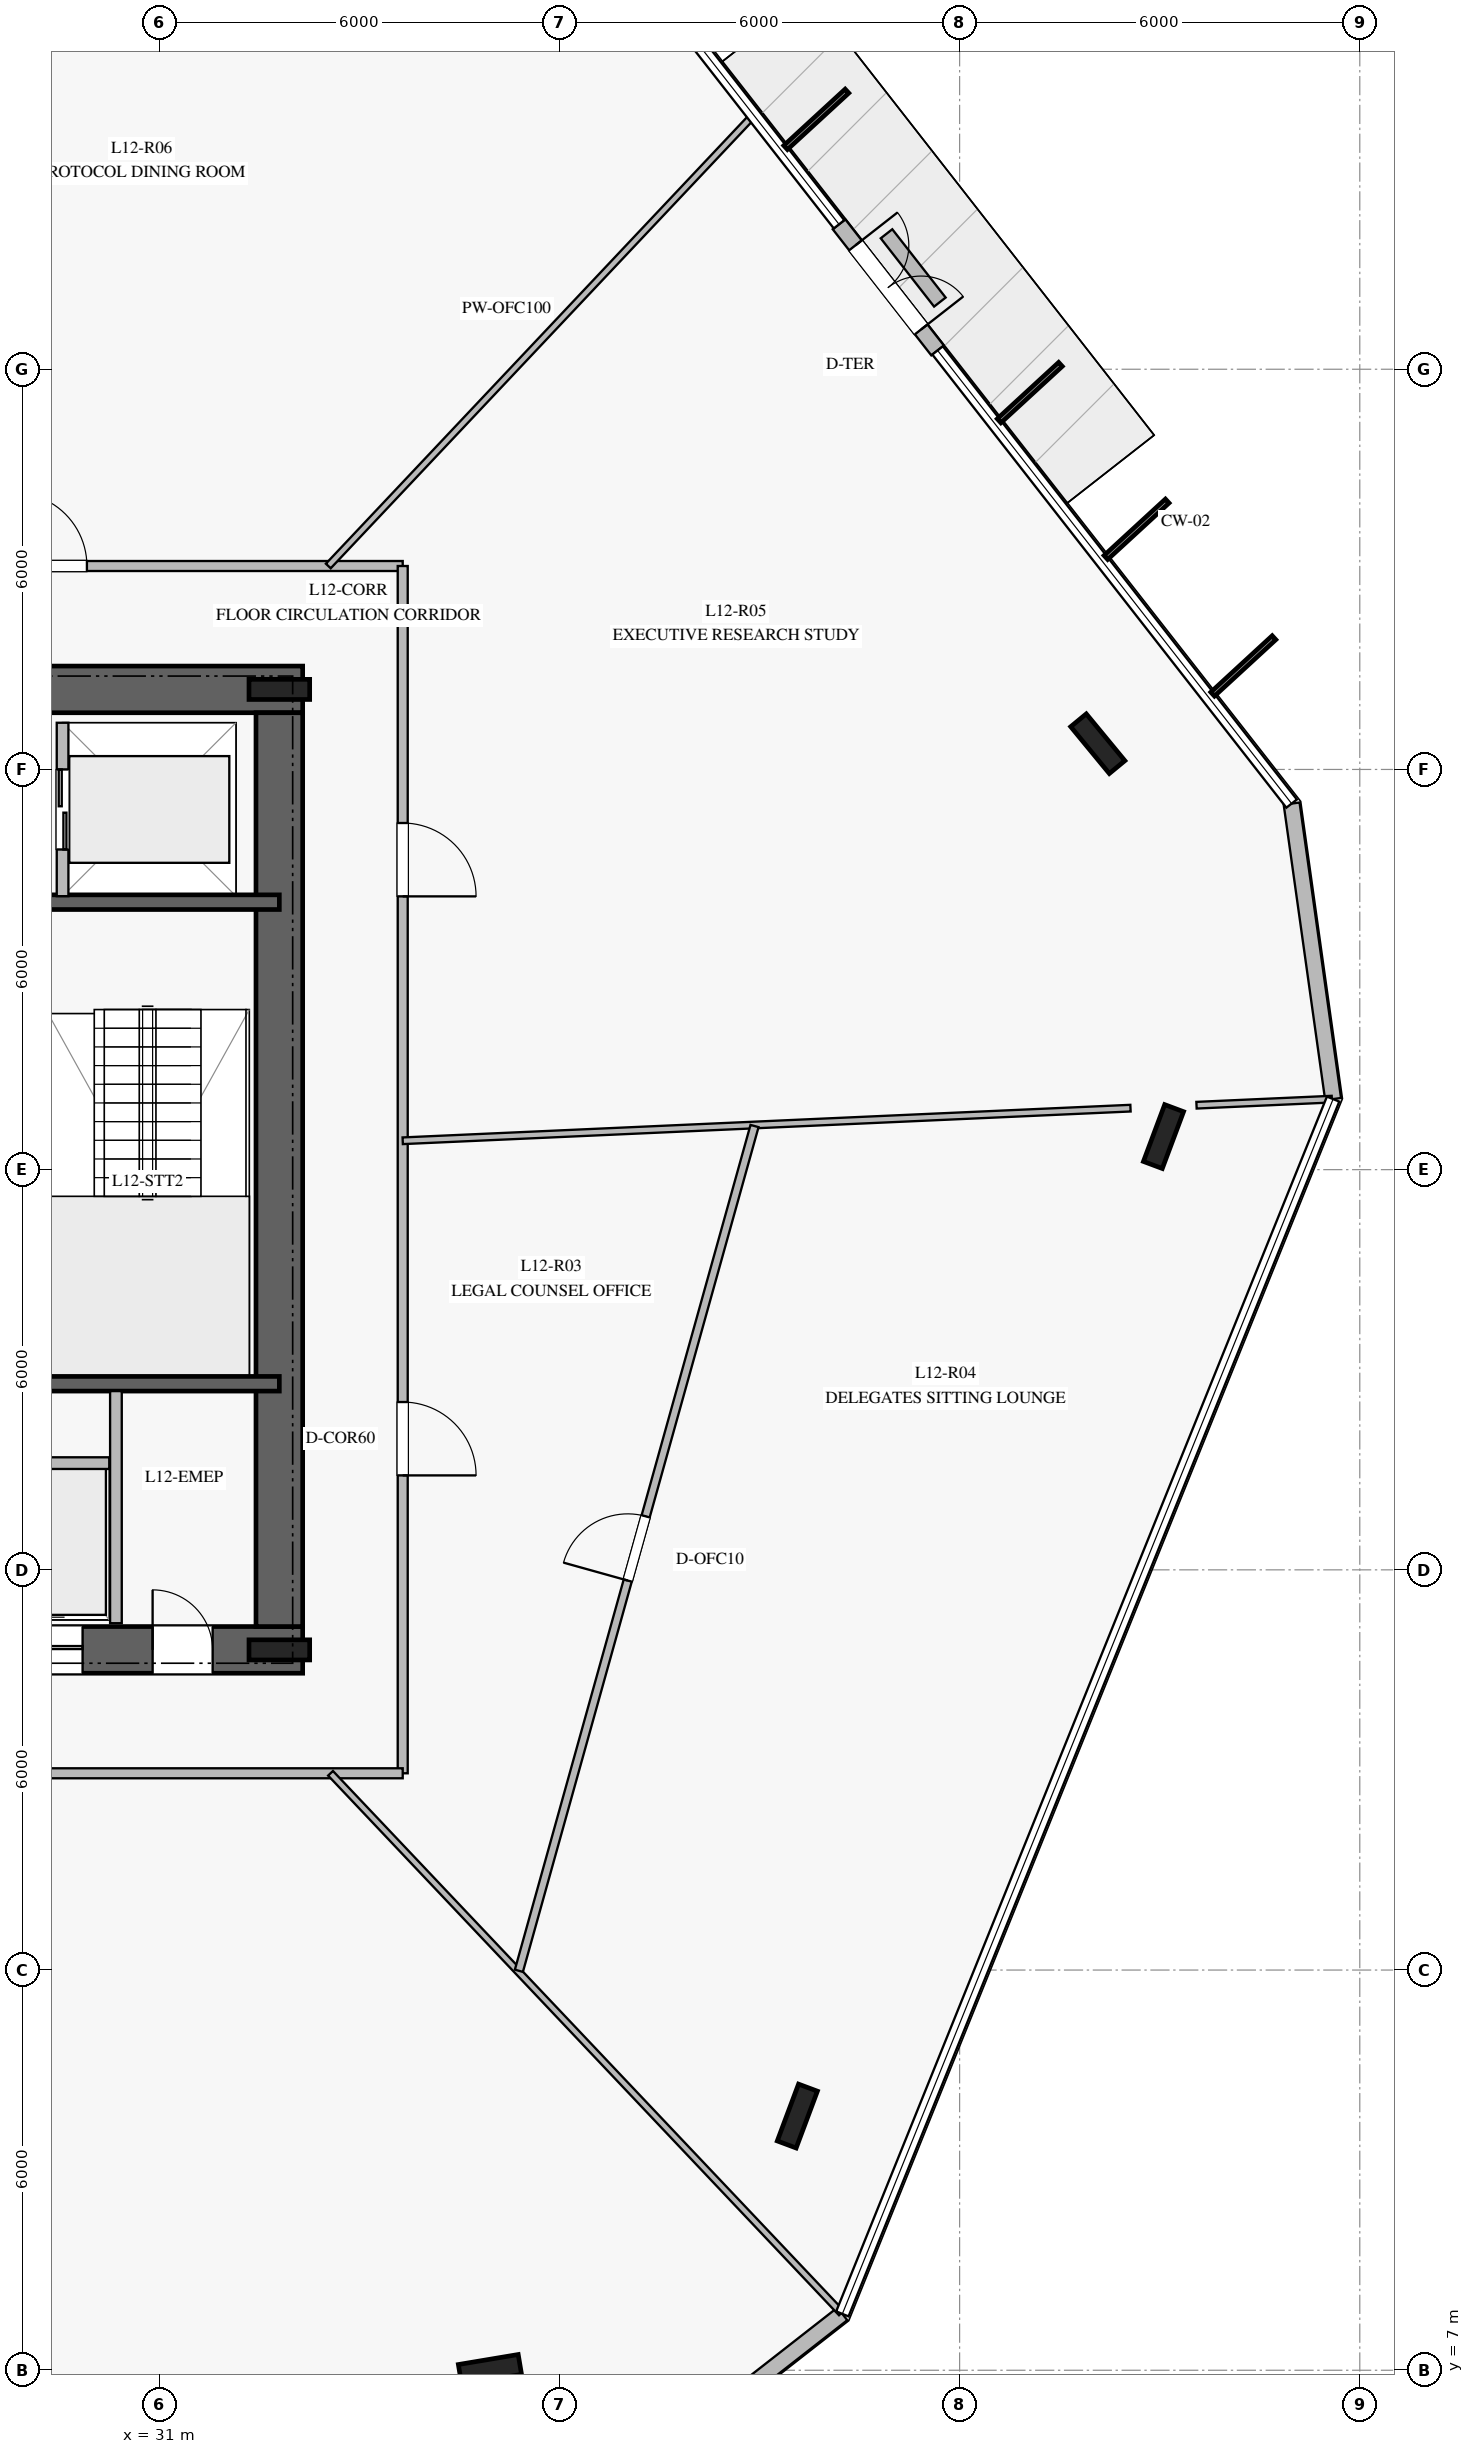
"""IFC4 building model, lengths in metres.
Left out: names, types, materials, properties, quantities, classifications, styles, units other than length and angle.
Written with IfcOpenShell. Run it as: python <this file> out.ifc"""

import sys

from ifc_helpers import new_model, si_unit, direction, frame, frame_2d, origin, origin_2d, place, context, subcontext, project, spatial, rectangle, i_section, extrude, element, fill, save


model = new_model("IFC4")
c1 = context("Model", 3, precision=1e-05, world=origin(), true_north=direction((0.0, 1.0)))
c2 = subcontext(c1, "Body", "Model", "MODEL_VIEW")
j1 = project(units=[si_unit("LENGTHUNIT", "METRE"), si_unit("PLANEANGLEUNIT", "RADIAN")], contexts=[c1])
p1 = place(None, origin())
s1 = spatial("IfcSite", under=j1, at=p1, CompositionType="ELEMENT")
p2 = place(p1, origin())
s2 = spatial("IfcBuilding", under=s1, at=p2, CompositionType="ELEMENT")
p3 = place(p2, frame((0.0, 0.0, 52.0)))
s3 = spatial("IfcBuildingStorey", under=s2, at=p3, CompositionType="ELEMENT", Elevation=52.0)
p4 = place(p3, frame((16.85, 17.8, 0.0), z_axis=(0.0, 0.0, 1.0), x_axis=(1.0, 0.0, 0.0)))
e1 = element("IfcWall", 1, at=p4, inside=s3, PredefinedType="SHEAR", context=c2, shape_type="SweptSolid", body=[
    extrude(rectangle(XDim=16.3, YDim=0.7, at=frame_2d((8.15, 0.0))), origin(), (0.0, 0.0, 1.0), 3.76),
])
p5 = place(p4, frame((5.1, 0.0, 0.0)))
e2 = element("IfcOpeningElement", 2, at=p5, cuts=e1, PredefinedType="OPENING", context=c2, shape_type="SweptSolid", body=[
    extrude(rectangle(XDim=1.2, YDim=2.25, at=frame_2d((0.6, 1.125))), frame((0.0, 0.36, 0.0), z_axis=(0.0, -1.0, 0.0), x_axis=(1.0, 0.0, 0.0)), (0.0, 0.0, 1.0), 0.72),
])
p6 = place(p4, frame((14.05, 0.0, 0.0)))
e3 = element("IfcOpeningElement", 3, at=p6, cuts=e1, PredefinedType="OPENING", context=c2, shape_type="SweptSolid", body=[
    extrude(rectangle(XDim=0.9, YDim=2.1, at=frame_2d((0.45, 1.05))), frame((0.0, 0.36, 0.0), z_axis=(0.0, -1.0, 0.0), x_axis=(1.0, 0.0, 0.0)), (0.0, 0.0, 1.0), 0.72),
])
p7 = place(p4, frame((7.95, 0.0, 0.0)))
e4 = element("IfcOpeningElement", 4, at=p7, cuts=e1, PredefinedType="OPENING", context=c2, shape_type="SweptSolid", body=[
    extrude(rectangle(XDim=1.1, YDim=2.2, at=frame_2d((0.55, 1.1))), frame((0.0, 0.36, 0.0), z_axis=(0.0, -1.0, 0.0), x_axis=(1.0, 0.0, 0.0)), (0.0, 0.0, 1.0), 0.72),
])
p8 = place(p4, frame((9.925, 0.0, 0.0)))
e5 = element("IfcOpeningElement", 5, at=p8, cuts=e1, PredefinedType="OPENING", context=c2, shape_type="SweptSolid", body=[
    extrude(rectangle(XDim=1.1, YDim=2.2, at=frame_2d((0.55, 1.1))), frame((0.0, 0.36, 0.0), z_axis=(0.0, -1.0, 0.0), x_axis=(1.0, 0.0, 0.0)), (0.0, 0.0, 1.0), 0.72),
])
p9 = place(p4, frame((11.9, 0.0, 0.0)))
e6 = element("IfcOpeningElement", 6, at=p9, cuts=e1, PredefinedType="OPENING", context=c2, shape_type="SweptSolid", body=[
    extrude(rectangle(XDim=1.1, YDim=2.2, at=frame_2d((0.55, 1.1))), frame((0.0, 0.36, 0.0), z_axis=(0.0, -1.0, 0.0), x_axis=(1.0, 0.0, 0.0)), (0.0, 0.0, 1.0), 0.72),
])
p10 = place(p3, frame((33.15, 32.2, 0.0), z_axis=(0.0, 0.0, 1.0), x_axis=(-1.0, 0.0, 0.0)))
e7 = element("IfcWall", 7, at=p10, inside=s3, PredefinedType="SHEAR", context=c2, shape_type="SweptSolid", body=[
    extrude(rectangle(XDim=16.3, YDim=0.7, at=frame_2d((8.15, 0.0))), origin(), (0.0, 0.0, 1.0), 3.76),
])
p11 = place(p10, frame((5.1, 0.0, 0.0)))
e8 = element("IfcOpeningElement", 8, at=p11, cuts=e7, PredefinedType="OPENING", context=c2, shape_type="SweptSolid", body=[
    extrude(rectangle(XDim=1.2, YDim=2.25, at=frame_2d((0.6, 1.125))), frame((0.0, 0.36, 0.0), z_axis=(0.0, -1.0, 0.0), x_axis=(1.0, 0.0, 0.0)), (0.0, 0.0, 1.0), 0.72),
])
p12 = place(p3, frame((32.8, 18.15, 0.0), z_axis=(0.0, 0.0, 1.0), x_axis=(0.0, 1.0, 0.0)))
e9 = element("IfcWall", 9, at=p12, inside=s3, PredefinedType="SHEAR", context=c2, shape_type="SweptSolid", body=[
    extrude(rectangle(XDim=13.7, YDim=0.7, at=frame_2d((6.85, 0.0))), origin(), (0.0, 0.0, 1.0), 3.76),
])
for number, where, z_axis, x_axis in (
    (10, (32.8, 17.8, 0.0), (0.0, 0.0, 1.0), (1.0, 0.0, 0.0)),
    (11, (32.8, 32.2, 0.0), (0.0, 0.0, 1.0), (1.0, 0.0, 0.0)),
):
    element("IfcColumn", number, at=place(p3, frame(where, z_axis=z_axis, x_axis=x_axis)), inside=s3, PredefinedType="COLUMN", context=c2, shape_type="SweptSolid", body=[
        extrude(i_section(OverallWidth=0.302, OverallDepth=0.91, WebThickness=0.021, FlangeThickness=0.04, at=origin_2d()), origin(), (0.0, 0.0, 1.0), 4.0),
    ])
for number, where, z_axis, x_axis in (
    (12, (29.08, 21.79, 0.0), (0.0, 0.0, 1.0), (1.0, 0.0, 0.0)),
    (13, (29.08, 29.01, 0.0), (0.0, 0.0, 1.0), (1.0, 0.0, 0.0)),
):
    element("IfcWall", number, at=place(p3, frame(where, z_axis=z_axis, x_axis=x_axis)), inside=s3, PredefinedType="SOLIDWALL", context=c2, shape_type="SweptSolid", body=[
        extrude(rectangle(XDim=3.72, YDim=0.22, at=frame_2d((1.86, 0.0))), origin(), (0.0, 0.0, 1.0), 3.76),
    ])
for number, where, z_axis, x_axis in (
    (14, (45.072, 31.386, 0.0), (0.0, 0.0, 1.0), (-0.636, 0.772, 0.0)),
    (15, (35.958, 7.012, 0.0), (0.0, 0.0, 1.0), (0.986, 0.165, 0.0)),
    (16, (40.567, 10.811, 0.0), (0.0, 0.0, 1.0), (0.35, 0.937, 0.0)),
    (17, (46.057, 25.496, 0.0), (0.0, 0.0, 1.0), (0.35, 0.937, 0.0)),
):
    element("IfcColumn", number, at=place(p3, frame(where, z_axis=z_axis, x_axis=x_axis)), inside=s3, PredefinedType="COLUMN", context=c2, shape_type="SweptSolid", body=[
        extrude(i_section(OverallWidth=0.302, OverallDepth=0.91, WebThickness=0.021, FlangeThickness=0.04, at=origin_2d()), origin(), (0.0, 0.0, 1.0), 4.0),
    ])
p13 = place(p3, frame((42.67, 37.282, 0.0), z_axis=(0.0, 0.0, 1.0), x_axis=(-0.615797994432, 0.787904074144, 0.0)))
e18 = element("IfcWall", 18, at=p13, inside=s3, PredefinedType="STANDARD", context=c2, shape_type="SweptSolid", body=[
    extrude(rectangle(XDim=2.4, YDim=0.24, at=frame_2d((1.2, 0.0))), origin(), (0.0, 0.0, 1.0), 3.76),
])
p14 = place(p13, frame((0.4, 0.0, 0.0)))
e19 = element("IfcOpeningElement", 19, at=p14, cuts=e18, PredefinedType="OPENING", context=c2, shape_type="SweptSolid", body=[
    extrude(rectangle(XDim=1.6, YDim=2.25, at=frame_2d((0.8, 1.125))), frame((0.0, 0.13, 0.0), z_axis=(0.0, -1.0, 0.0), x_axis=(1.0, 0.0, 0.0)), (0.0, 0.0, 1.0), 0.26),
])
p15 = place(p3, frame((37.717, 5.091, 0.0), z_axis=(0.0, 0.0, 1.0), x_axis=(0.788016099046, 0.615654633414, 0.0)))
e20 = element("IfcWall", 20, at=p15, inside=s3, PredefinedType="STANDARD", context=c2, shape_type="SweptSolid", body=[
    extrude(rectangle(XDim=4.473, YDim=0.24, at=frame_2d((2.237, 0.0))), origin(), (0.0, 0.0, 1.0), 3.76),
])
p16 = place(p3, frame((48.6, 26.058, 0.0), z_axis=(0.0, 0.0, 1.0), x_axis=(-0.139059990467, 0.990283958797, 0.0)))
e21 = element("IfcWall", 21, at=p16, inside=s3, PredefinedType="STANDARD", context=c2, shape_type="SweptSolid", body=[
    extrude(rectangle(XDim=4.473, YDim=0.24, at=frame_2d((2.237, 0.0))), origin(), (0.0, 0.0, 1.0), 3.76),
])
p17 = place(p3, frame((42.704, 38.007, 0.0), z_axis=(0.0, 0.0, 1.0), x_axis=(-0.615695084904, 0.787984493772, 0.0)))
e22 = element("IfcWall", 22, at=p17, inside=s3, PredefinedType="USERDEFINED", context=c2, shape_type="SweptSolid", body=[
    extrude(rectangle(XDim=1.299, YDim=0.22, at=frame_2d((0.65, 0.0))), origin(), (0.0, 0.0, 1.0), 0.4),
])
p18 = place(p3, frame((30.35, 18.2, 0.0), z_axis=(0.0, 0.0, 1.0), x_axis=(0.0, 1.0, 0.0)))
e23 = element("IfcWall", 23, at=p18, inside=s3, PredefinedType="PARTITIONING", context=c2, shape_type="SweptSolid", body=[
    extrude(rectangle(XDim=3.48, YDim=0.175, at=frame_2d((1.74, 0.0))), origin(), (0.0, 0.0, 1.0), 3.76),
])
p19 = place(p3, frame((28.35, 20.6, 0.0), z_axis=(0.0, 0.0, 1.0), x_axis=(1.0, 0.0, 0.0)))
e24 = element("IfcWall", 24, at=p19, inside=s3, PredefinedType="PARTITIONING", context=c2, shape_type="SweptSolid", body=[
    extrude(rectangle(XDim=1.9, YDim=0.175, at=frame_2d((0.95, 0.0))), origin(), (0.0, 0.0, 1.0), 3.76),
])
p20 = place(p3, frame((29.55, 29.1, 0.0), z_axis=(0.0, 0.0, 1.0), x_axis=(0.0, 1.0, 0.0)))
e25 = element("IfcWall", 25, at=p20, inside=s3, PredefinedType="PARTITIONING", context=c2, shape_type="SweptSolid", body=[
    extrude(rectangle(XDim=2.6, YDim=0.175, at=frame_2d((1.3, 0.0))), origin(), (0.0, 0.0, 1.0), 3.76),
])
p21 = place(p20, frame((0.7, 0.0, 0.0)))
e26 = element("IfcOpeningElement", 26, at=p21, cuts=e25, PredefinedType="OPENING", context=c2, shape_type="SweptSolid", body=[
    extrude(rectangle(XDim=1.2, YDim=2.2, at=frame_2d((0.6, 1.1))), frame((0.0, 0.098, 0.0), z_axis=(0.0, -1.0, 0.0), x_axis=(1.0, 0.0, 0.0)), (0.0, 0.0, 1.0), 0.195),
])
p22 = place(p3, frame((15.35, 34.05, 0.0), z_axis=(0.0, 0.0, 1.0), x_axis=(1.0, 0.0, 0.0)))
e27 = element("IfcWall", 27, at=p22, inside=s3, PredefinedType="PARTITIONING", context=c2, shape_type="SweptSolid", body=[
    extrude(rectangle(XDim=19.3, YDim=0.15, at=frame_2d((9.65, 0.0))), origin(), (0.0, 0.0, 1.0), 3.21),
])
p23 = place(p22, frame((13.465, 0.0, 0.0)))
e28 = element("IfcOpeningElement", 28, at=p23, cuts=e27, PredefinedType="OPENING", context=c2, shape_type="SweptSolid", body=[
    extrude(rectangle(XDim=1.1, YDim=2.2, at=frame_2d((0.55, 1.1))), frame((0.0, 0.085, 0.0), z_axis=(0.0, -1.0, 0.0), x_axis=(1.0, 0.0, 0.0)), (0.0, 0.0, 1.0), 0.17),
])
p24 = place(p22, frame((4.424, 0.0, 0.0)))
e29 = element("IfcOpeningElement", 29, at=p24, cuts=e27, PredefinedType="OPENING", context=c2, shape_type="SweptSolid", body=[
    extrude(rectangle(XDim=1.1, YDim=2.2, at=frame_2d((0.55, 1.1))), frame((0.0, 0.085, 0.0), z_axis=(0.0, -1.0, 0.0), x_axis=(1.0, 0.0, 0.0)), (0.0, 0.0, 1.0), 0.17),
])
p25 = place(p3, frame((34.65, 34.05, 0.0), z_axis=(0.0, 0.0, 1.0), x_axis=(0.0, -1.0, 0.0)))
e30 = element("IfcWall", 30, at=p25, inside=s3, PredefinedType="PARTITIONING", context=c2, shape_type="SweptSolid", body=[
    extrude(rectangle(XDim=18.1, YDim=0.15, at=frame_2d((9.05, 0.0))), origin(), (0.0, 0.0, 1.0), 3.21),
])
p26 = place(p25, frame((12.534, 0.0, 0.0)))
e31 = element("IfcOpeningElement", 31, at=p26, cuts=e30, PredefinedType="OPENING", context=c2, shape_type="SweptSolid", body=[
    extrude(rectangle(XDim=1.1, YDim=2.2, at=frame_2d((0.55, 1.1))), frame((0.0, 0.085, 0.0), z_axis=(0.0, -1.0, 0.0), x_axis=(1.0, 0.0, 0.0)), (0.0, 0.0, 1.0), 0.17),
])
p27 = place(p25, frame((3.853, 0.0, 0.0)))
e32 = element("IfcOpeningElement", 32, at=p27, cuts=e30, PredefinedType="OPENING", context=c2, shape_type="SweptSolid", body=[
    extrude(rectangle(XDim=1.1, YDim=2.2, at=frame_2d((0.55, 1.1))), frame((0.0, 0.085, 0.0), z_axis=(0.0, -1.0, 0.0), x_axis=(1.0, 0.0, 0.0)), (0.0, 0.0, 1.0), 0.17),
])
p28 = place(p3, frame((34.65, 15.95, 0.0), z_axis=(0.0, 0.0, 1.0), x_axis=(-1.0, 0.0, 0.0)))
e33 = element("IfcWall", 33, at=p28, inside=s3, PredefinedType="PARTITIONING", context=c2, shape_type="SweptSolid", body=[
    extrude(rectangle(XDim=19.3, YDim=0.15, at=frame_2d((9.65, 0.0))), origin(), (0.0, 0.0, 1.0), 3.21),
])
p29 = place(p28, frame((15.01, 0.0, 0.0)))
e34 = element("IfcOpeningElement", 34, at=p29, cuts=e33, PredefinedType="OPENING", context=c2, shape_type="SweptSolid", body=[
    extrude(rectangle(XDim=1.1, YDim=2.2, at=frame_2d((0.55, 1.1))), frame((0.0, 0.085, 0.0), z_axis=(0.0, -1.0, 0.0), x_axis=(1.0, 0.0, 0.0)), (0.0, 0.0, 1.0), 0.17),
])
p30 = place(p28, frame((6.126, 0.0, 0.0)))
e35 = element("IfcOpeningElement", 35, at=p30, cuts=e33, PredefinedType="OPENING", context=c2, shape_type="SweptSolid", body=[
    extrude(rectangle(XDim=1.1, YDim=2.2, at=frame_2d((0.55, 1.1))), frame((0.0, 0.085, 0.0), z_axis=(0.0, -1.0, 0.0), x_axis=(1.0, 0.0, 0.0)), (0.0, 0.0, 1.0), 0.17),
])
p31 = place(p3, frame((33.534, 34.05, 0.0), z_axis=(0.0, 0.0, 1.0), x_axis=(0.686105608839, 0.727501954307, 0.0)))
e36 = element("IfcWall", 36, at=p31, inside=s3, PredefinedType="MOVABLE", context=c2, shape_type="SweptSolid", body=[
    extrude(rectangle(XDim=9.277, YDim=0.1, at=frame_2d((4.639, 0.0))), origin(), (0.0, 0.0, 1.0), 3.06),
])
p32 = place(p3, frame((33.568, 15.95, 0.0), z_axis=(0.0, 0.0, 1.0), x_axis=(0.687493592765, -0.726190443277, 0.0)))
e37 = element("IfcWall", 37, at=p32, inside=s3, PredefinedType="MOVABLE", context=c2, shape_type="SweptSolid", body=[
    extrude(rectangle(XDim=11.142, YDim=0.1, at=frame_2d((5.571, 0.0))), origin(), (0.0, 0.0, 1.0), 3.06),
])
p33 = place(p3, frame((34.65, 25.433, 0.0), z_axis=(0.0, 0.0, 1.0), x_axis=(0.998997369184, 0.044768921838, 0.0)))
e38 = element("IfcWall", 38, at=p33, inside=s3, PredefinedType="MOVABLE", context=c2, shape_type="SweptSolid", body=[
    extrude(rectangle(XDim=10.923, YDim=0.1, at=frame_2d((5.461, 0.0))), origin(), (0.0, 0.0, 1.0), 3.05),
])
p34 = place(p3, frame((46.552, 25.966, 0.0), z_axis=(0.0, 0.0, 1.0), x_axis=(0.998999775815, 0.044715186693, 0.0)))
e39 = element("IfcWall", 39, at=p34, inside=s3, PredefinedType="MOVABLE", context=c2, shape_type="SweptSolid", body=[
    extrude(rectangle(XDim=2.031, YDim=0.1, at=frame_2d((1.016, 0.0))), origin(), (0.0, 0.0, 1.0), 3.76),
])
p35 = place(p3, frame((36.392, 12.989, 0.0), z_axis=(0.0, 0.0, 1.0), x_axis=(0.268695208085, 0.963225251513, 0.0)))
e40 = element("IfcWall", 40, at=p35, inside=s3, PredefinedType="PARTITIONING", context=c2, shape_type="SweptSolid", body=[
    extrude(rectangle(XDim=13.149, YDim=0.125, at=frame_2d((6.574, 0.0))), origin(), (0.0, 0.0, 1.0), 3.21),
])
p36 = place(p35, frame((6.074, 0.0, 0.0)))
e41 = element("IfcOpeningElement", 41, at=p36, cuts=e40, PredefinedType="OPENING", context=c2, shape_type="SweptSolid", body=[
    extrude(rectangle(XDim=1.0, YDim=2.15, at=frame_2d((0.5, 1.075))), frame((0.0, 0.073, 0.0), z_axis=(0.0, -1.0, 0.0), x_axis=(1.0, 0.0, 0.0)), (0.0, 0.0, 1.0), 0.145),
])
p37 = place(p14, frame((1.6, 0.0, 0.0), z_axis=(0.0, 0.0, 1.0), x_axis=(-1.0, 0.0, 0.0)))
e42 = element("IfcDoor", 42, at=p37, inside=s3, OperationType="DOUBLE_DOOR_SINGLE_SWING", PredefinedType="DOOR", context=c2, shape_type="SweptSolid", body=[
    extrude(rectangle(XDim=1.6, YDim=2.25, at=frame_2d((0.8, 1.125))), frame((0.0, 0.025, 0.0), z_axis=(0.0, -1.0, 0.0), x_axis=(1.0, 0.0, 0.0)), (0.0, 0.0, 1.0), 0.05),
])
fill(e19, e42)
p38 = place(p6, origin())
e43 = element("IfcDoor", 43, at=p38, inside=s3, OperationType="SINGLE_SWING_LEFT", PredefinedType="DOOR", context=c2, shape_type="SweptSolid", body=[
    extrude(rectangle(XDim=0.9, YDim=2.1, at=frame_2d((0.45, 1.05))), frame((0.0, 0.025, 0.0), z_axis=(0.0, -1.0, 0.0), x_axis=(1.0, 0.0, 0.0)), (0.0, 0.0, 1.0), 0.05),
])
fill(e3, e43)
p39 = place(p9, origin())
e44 = element("IfcDoor", 44, at=p39, inside=s3, OperationType="DOUBLE_DOOR_SLIDING", PredefinedType="DOOR", context=c2, shape_type="SweptSolid", body=[
    extrude(rectangle(XDim=1.1, YDim=2.2, at=frame_2d((0.55, 1.1))), frame((0.0, 0.025, 0.0), z_axis=(0.0, -1.0, 0.0), x_axis=(1.0, 0.0, 0.0)), (0.0, 0.0, 1.0), 0.05),
])
fill(e6, e44)
p40 = place(p21, origin())
e45 = element("IfcDoor", 45, at=p40, inside=s3, OperationType="DOUBLE_DOOR_SLIDING", PredefinedType="DOOR", context=c2, shape_type="SweptSolid", body=[
    extrude(rectangle(XDim=1.2, YDim=2.2, at=frame_2d((0.6, 1.1))), frame((0.0, 0.025, 0.0), z_axis=(0.0, -1.0, 0.0), x_axis=(1.0, 0.0, 0.0)), (0.0, 0.0, 1.0), 0.05),
])
fill(e26, e45)
p41 = place(p26, origin())
e46 = element("IfcDoor", 46, at=p41, inside=s3, OperationType="SINGLE_SWING_RIGHT", PredefinedType="DOOR", context=c2, shape_type="SweptSolid", body=[
    extrude(rectangle(XDim=1.1, YDim=2.2, at=frame_2d((0.55, 1.1))), frame((0.0, 0.025, 0.0), z_axis=(0.0, -1.0, 0.0), x_axis=(1.0, 0.0, 0.0)), (0.0, 0.0, 1.0), 0.05),
])
fill(e31, e46)
p42 = place(p36, origin())
e47 = element("IfcDoor", 47, at=p42, inside=s3, OperationType="SINGLE_SWING_LEFT", PredefinedType="DOOR", context=c2, shape_type="SweptSolid", body=[
    extrude(rectangle(XDim=1.0, YDim=2.15, at=frame_2d((0.5, 1.075))), frame((0.0, 0.025, 0.0), z_axis=(0.0, -1.0, 0.0), x_axis=(1.0, 0.0, 0.0)), (0.0, 0.0, 1.0), 0.05),
])
fill(e41, e47)
p43 = place(p27, origin())
e48 = element("IfcDoor", 48, at=p43, inside=s3, OperationType="SINGLE_SWING_RIGHT", PredefinedType="DOOR", context=c2, shape_type="SweptSolid", body=[
    extrude(rectangle(XDim=1.1, YDim=2.2, at=frame_2d((0.55, 1.1))), frame((0.0, 0.025, 0.0), z_axis=(0.0, -1.0, 0.0), x_axis=(1.0, 0.0, 0.0)), (0.0, 0.0, 1.0), 0.05),
])
fill(e32, e48)
p44 = place(p23, origin())
e49 = element("IfcDoor", 49, at=p44, inside=s3, OperationType="SINGLE_SWING_LEFT", PredefinedType="DOOR", context=c2, shape_type="SweptSolid", body=[
    extrude(rectangle(XDim=1.1, YDim=2.2, at=frame_2d((0.55, 1.1))), frame((0.0, 0.025, 0.0), z_axis=(0.0, -1.0, 0.0), x_axis=(1.0, 0.0, 0.0)), (0.0, 0.0, 1.0), 0.05),
])
fill(e28, e49)
save(model, sys.argv[1])
